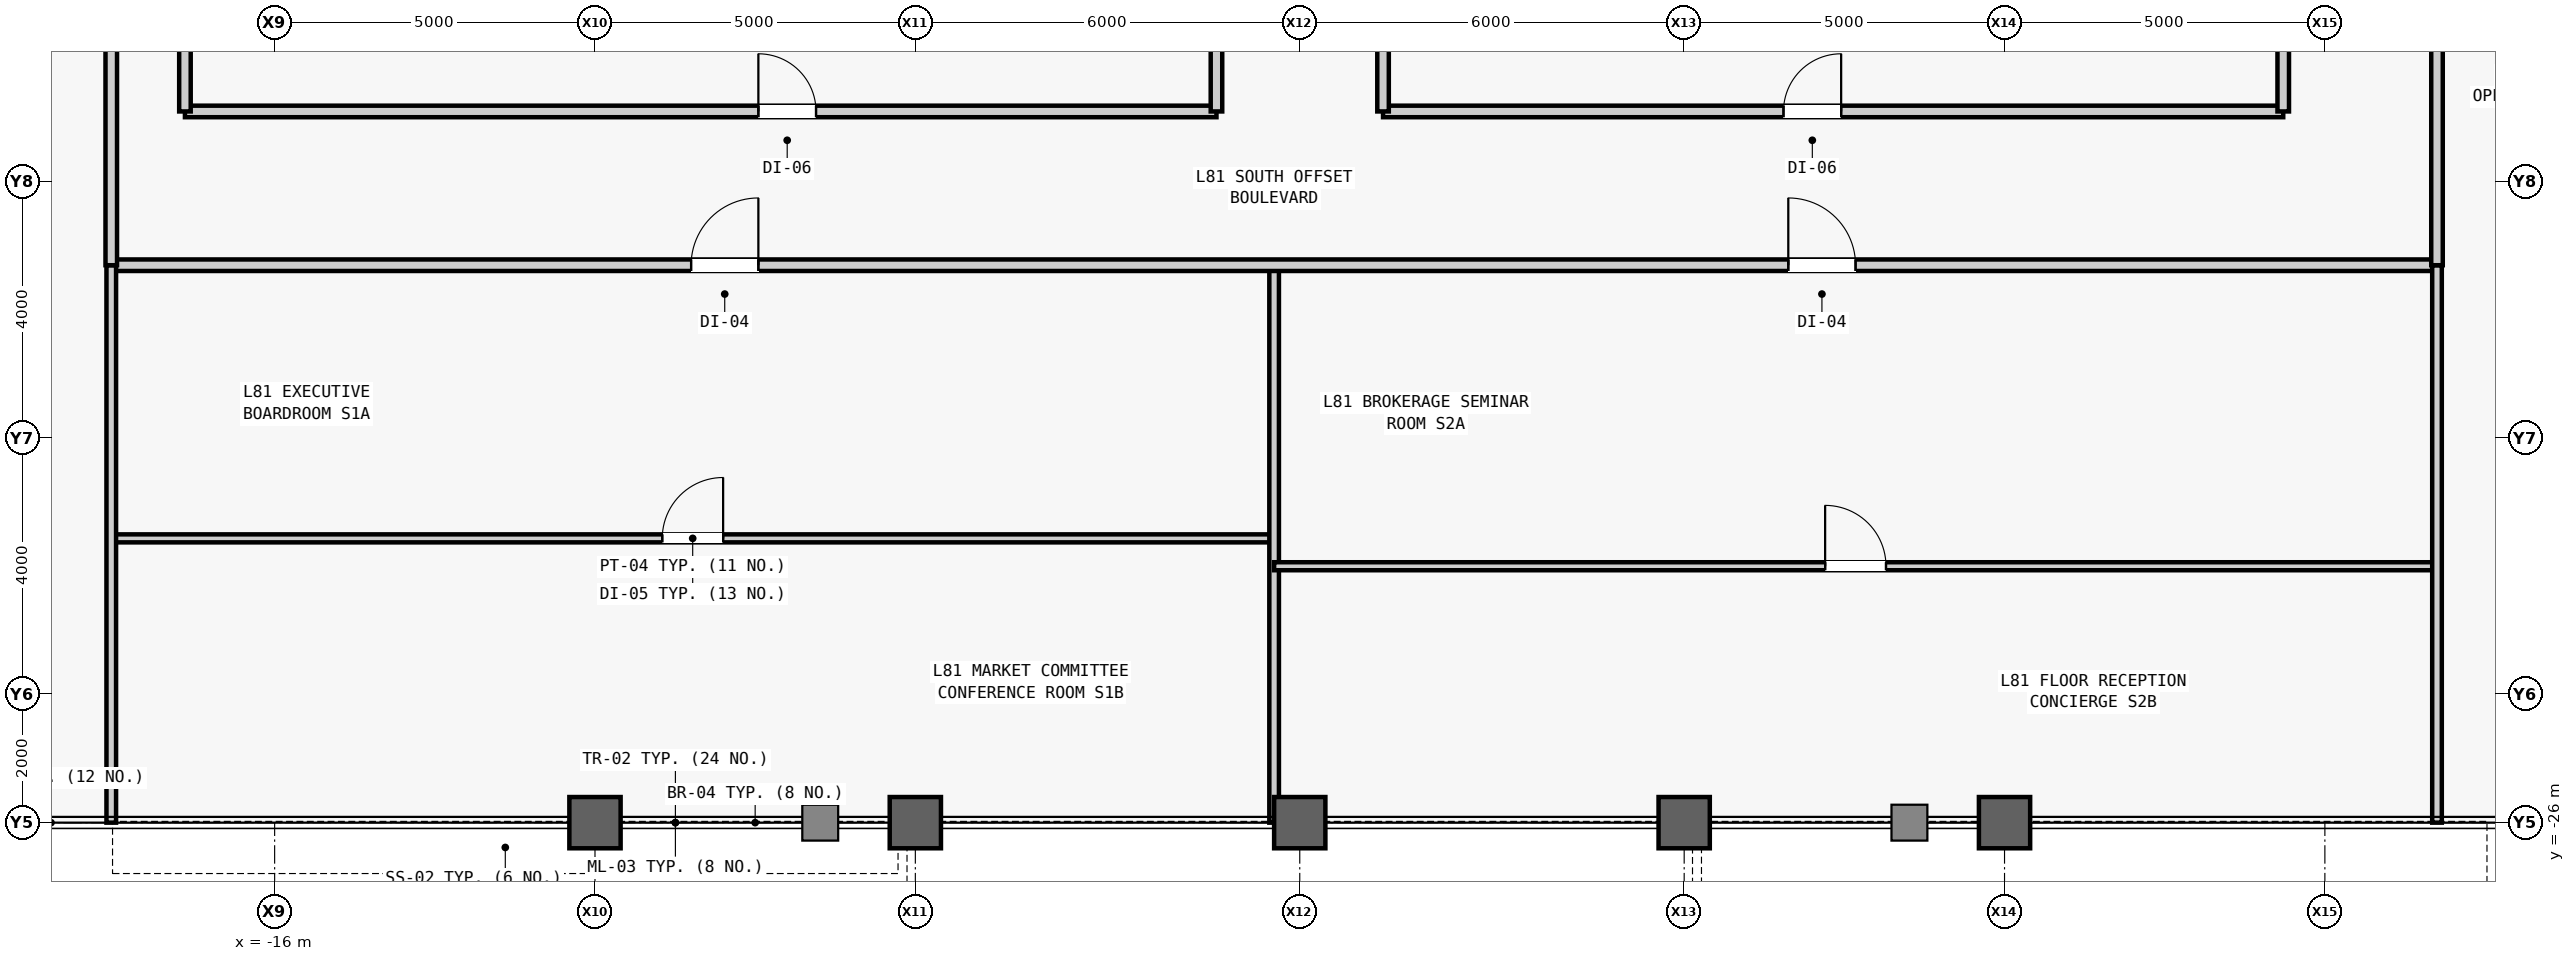
"""IFC4 building model, lengths in metres.
Left out: names, types, materials, properties, quantities, classifications, styles, units other than length and angle.
Written with IfcOpenShell. Run it as: python <this file> out.ifc"""

import sys

from ifc_helpers import new_model, si_unit, direction, frame, frame_2d, origin, origin_2d, place, context, subcontext, project, spatial, rectangle, hollow_rectangle, extrude, source, transform, mapped, element, fill, save


model = new_model("IFC4")
c1 = context("Model", 3, precision=1e-05, world=origin(), true_north=direction((0.0, 1.0)))
c2 = subcontext(c1, "Body", "Model", "MODEL_VIEW")
j1 = project(units=[si_unit("LENGTHUNIT", "METRE"), si_unit("PLANEANGLEUNIT", "RADIAN")], contexts=[c1])
p1 = place(None, origin())
s1 = spatial("IfcSite", under=j1, at=p1, CompositionType="ELEMENT")
p2 = place(p1, origin())
s2 = spatial("IfcBuilding", under=s1, at=p2, CompositionType="ELEMENT")
p3 = place(p2, frame((0.0, 0.0, 342.3)))
s3 = spatial("IfcBuildingStorey", under=s2, at=p3, CompositionType="ELEMENT", Elevation=342.3)
m1 = source(origin(), c2, "Body", "SweptSolid", [
    extrude(hollow_rectangle(XDim=0.8, YDim=0.8, WallThickness=0.045, at=origin_2d()), origin(), (0.0, 0.0, 1.0), 4.0),
])
for number, where, z_axis, x_axis in (
    (1, (-11.0, -26.0, 0.0), (0.0, 0.0, 1.0), (1.0, 0.0, 0.0)),
    (2, (-6.0, -26.0, 0.0), (0.0, 0.0, 1.0), (1.0, 0.0, 0.0)),
    (3, (0.0, -26.0, 0.0), (0.0, 0.0, 1.0), (1.0, 0.0, 0.0)),
    (4, (6.0, -26.0, 0.0), (0.0, 0.0, 1.0), (1.0, 0.0, 0.0)),
    (5, (11.0, -26.0, 0.0), (0.0, 0.0, 1.0), (1.0, 0.0, 0.0)),
):
    element("IfcColumn", number, at=place(p3, frame(where, z_axis=z_axis, x_axis=x_axis)), inside=s3, PredefinedType="COLUMN", context=c2, shape_type="MappedRepresentation", body=[
        mapped(m1, transform((0.0, 0.0, 0.0), scale=1.0)),
    ])
m2 = source(origin(), c2, "Body", "SweptSolid", [
    extrude(rectangle(XDim=16.1, YDim=0.18, at=frame_2d((8.05, 0.0))), origin(), (0.0, 0.0, 1.0), 3.7),
])
p4 = place(p3, frame((-17.4, -14.9, 0.0), z_axis=(0.0, 0.0, 1.0), x_axis=(1.0, 0.0, 0.0)))
e6 = element("IfcWall", 6, at=p4, inside=s3, PredefinedType="PARTITIONING", context=c2, shape_type="MappedRepresentation", body=[
    mapped(m2, transform((0.0, 0.0, 0.0), scale=1.0)),
])
m3 = source(origin(), c2, "Body", "SweptSolid", [
    extrude(rectangle(XDim=0.9, YDim=2.15, at=frame_2d((0.45, 1.075))), frame((0.0, 0.1, 0.0), z_axis=(0.0, -1.0, 0.0), x_axis=(1.0, 0.0, 0.0)), (0.0, 0.0, 1.0), 0.2),
])
p5 = place(p4, frame((8.95, 0.0, 0.0)))
e7 = element("IfcOpeningElement", 7, at=p5, cuts=e6, PredefinedType="OPENING", context=c2, shape_type="MappedRepresentation", body=[
    mapped(m3, transform((0.0, 0.0, 0.0), scale=1.0)),
])
m4 = source(origin(), c2, "Body", "SweptSolid", [
    extrude(rectangle(XDim=5.1, YDim=0.18, at=frame_2d((2.55, 0.0))), origin(), (0.0, 0.0, 1.0), 3.7),
])
p6 = place(p3, frame((-17.4, -14.9, 0.0), z_axis=(0.0, 0.0, 1.0), x_axis=(0.0, 1.0, 0.0)))
e8 = element("IfcWall", 8, at=p6, inside=s3, PredefinedType="PARTITIONING", context=c2, shape_type="MappedRepresentation", body=[
    mapped(m4, transform((0.0, 0.0, 0.0), scale=1.0)),
])
m5 = source(origin(), c2, "Body", "SweptSolid", [
    extrude(rectangle(XDim=3.9, YDim=0.18, at=frame_2d((1.95, 0.0))), origin(), (0.0, 0.0, 1.0), 3.7),
])
p7 = place(p3, frame((-1.3, -14.9, 0.0), z_axis=(0.0, 0.0, 1.0), x_axis=(0.0, 1.0, 0.0)))
e9 = element("IfcWall", 9, at=p7, inside=s3, PredefinedType="PARTITIONING", context=c2, shape_type="MappedRepresentation", body=[
    mapped(m5, transform((0.0, 0.0, 0.0), scale=1.0)),
])
m6 = source(origin(), c2, "Body", "SweptSolid", [
    extrude(rectangle(XDim=14.05, YDim=0.18, at=frame_2d((7.025, 0.0))), origin(), (0.0, 0.0, 1.0), 3.7),
])
p8 = place(p3, frame((1.3, -14.9, 0.0), z_axis=(0.0, 0.0, 1.0), x_axis=(1.0, 0.0, 0.0)))
e10 = element("IfcWall", 10, at=p8, inside=s3, PredefinedType="PARTITIONING", context=c2, shape_type="MappedRepresentation", body=[
    mapped(m6, transform((0.0, 0.0, 0.0), scale=1.0)),
])
p9 = place(p8, frame((6.25, 0.0, 0.0)))
e11 = element("IfcOpeningElement", 11, at=p9, cuts=e10, PredefinedType="OPENING", context=c2, shape_type="MappedRepresentation", body=[
    mapped(m3, transform((0.0, 0.0, 0.0), scale=1.0)),
])
p10 = place(p3, frame((1.3, -14.9, 0.0), z_axis=(0.0, 0.0, 1.0), x_axis=(0.0, 1.0, 0.0)))
e12 = element("IfcWall", 12, at=p10, inside=s3, PredefinedType="PARTITIONING", context=c2, shape_type="MappedRepresentation", body=[
    mapped(m5, transform((0.0, 0.0, 0.0), scale=1.0)),
])
m7 = source(origin(), c2, "Body", "SweptSolid", [
    extrude(rectangle(XDim=4.4, YDim=0.18, at=frame_2d((2.2, 0.0))), origin(), (0.0, 0.0, 1.0), 3.7),
])
p11 = place(p3, frame((15.35, -14.9, 0.0), z_axis=(0.0, 0.0, 1.0), x_axis=(0.0, 1.0, 0.0)))
e13 = element("IfcWall", 13, at=p11, inside=s3, PredefinedType="PARTITIONING", context=c2, shape_type="MappedRepresentation", body=[
    mapped(m7, transform((0.0, 0.0, 0.0), scale=1.0)),
])
m8 = source(origin(), c2, "Body", "SweptSolid", [
    extrude(rectangle(XDim=18.15, YDim=0.125, at=frame_2d((9.075, 0.0))), origin(), (0.0, 0.0, 1.0), 3.7),
])
p12 = place(p3, frame((-18.55, -21.563, 0.0), z_axis=(0.0, 0.0, 1.0), x_axis=(1.0, 0.0, 0.0)))
e14 = element("IfcWall", 14, at=p12, inside=s3, PredefinedType="PARTITIONING", context=c2, shape_type="MappedRepresentation", body=[
    mapped(m8, transform((0.0, 0.0, 0.0), scale=1.0)),
])
m9 = source(origin(), c2, "Body", "SweptSolid", [
    extrude(rectangle(XDim=0.95, YDim=2.15, at=frame_2d((0.475, 1.075))), frame((0.0, 0.073, 0.0), z_axis=(0.0, -1.0, 0.0), x_axis=(1.0, 0.0, 0.0)), (0.0, 0.0, 1.0), 0.145),
])
p13 = place(p12, frame((8.6, 0.0, 0.0)))
e15 = element("IfcOpeningElement", 15, at=p13, cuts=e14, PredefinedType="OPENING", context=c2, shape_type="MappedRepresentation", body=[
    mapped(m9, transform((0.0, 0.0, 0.0), scale=1.0)),
])
m10 = source(origin(), c2, "Body", "SweptSolid", [
    extrude(rectangle(XDim=8.7, YDim=0.15, at=frame_2d((4.35, 0.0))), origin(), (0.0, 0.0, 1.0), 3.7),
])
p14 = place(p3, frame((-0.4, -26.0, 0.0), z_axis=(0.0, 0.0, 1.0), x_axis=(0.0, 1.0, 0.0)))
e16 = element("IfcWall", 16, at=p14, inside=s3, PredefinedType="PARTITIONING", context=c2, shape_type="MappedRepresentation", body=[
    mapped(m10, transform((0.0, 0.0, 0.0), scale=1.0)),
])
m11 = source(origin(), c2, "Body", "SweptSolid", [
    extrude(rectangle(XDim=18.15, YDim=0.125, at=frame_2d((9.075, 0.0))), origin(), (0.0, 0.0, 1.0), 3.7),
])
p15 = place(p3, frame((-0.4, -21.998, 0.0), z_axis=(0.0, 0.0, 1.0), x_axis=(1.0, 0.0, 0.0)))
e17 = element("IfcWall", 17, at=p15, inside=s3, PredefinedType="PARTITIONING", context=c2, shape_type="MappedRepresentation", body=[
    mapped(m11, transform((0.0, 0.0, 0.0), scale=1.0)),
])
p16 = place(p15, frame((8.6, 0.0, 0.0)))
e18 = element("IfcOpeningElement", 18, at=p16, cuts=e17, PredefinedType="OPENING", context=c2, shape_type="MappedRepresentation", body=[
    mapped(m9, transform((0.0, 0.0, 0.0), scale=1.0)),
])
m12 = source(origin(), c2, "Body", "SweptSolid", [
    extrude(rectangle(XDim=36.3, YDim=0.18, at=frame_2d((18.15, 0.0))), origin(), (0.0, 0.0, 1.0), 3.7),
])
p17 = place(p3, frame((-18.55, -17.3, 0.0), z_axis=(0.0, 0.0, 1.0), x_axis=(1.0, 0.0, 0.0)))
e19 = element("IfcWall", 19, at=p17, inside=s3, PredefinedType="PARTITIONING", context=c2, shape_type="MappedRepresentation", body=[
    mapped(m12, transform((0.0, 0.0, 0.0), scale=1.0)),
])
m13 = source(origin(), c2, "Body", "SweptSolid", [
    extrude(rectangle(XDim=1.05, YDim=2.2, at=frame_2d((0.525, 1.1))), frame((0.0, 0.1, 0.0), z_axis=(0.0, -1.0, 0.0), x_axis=(1.0, 0.0, 0.0)), (0.0, 0.0, 1.0), 0.2),
])
p18 = place(p17, frame((9.05, 0.0, 0.0)))
e20 = element("IfcOpeningElement", 20, at=p18, cuts=e19, PredefinedType="OPENING", context=c2, shape_type="MappedRepresentation", body=[
    mapped(m13, transform((0.0, 0.0, 0.0), scale=1.0)),
])
p19 = place(p17, frame((26.175, 0.0, 0.0)))
e21 = element("IfcOpeningElement", 21, at=p19, cuts=e19, PredefinedType="OPENING", context=c2, shape_type="MappedRepresentation", body=[
    mapped(m13, transform((0.0, 0.0, 0.0), scale=1.0)),
])
for number, where, z_axis, x_axis in (
    (22, (-18.55, -26.0, 0.0), (0.0, 0.0, 1.0), (0.0, 1.0, 0.0)),
    (23, (17.75, -26.0, 0.0), (0.0, 0.0, 1.0), (0.0, 1.0, 0.0)),
):
    element("IfcWall", number, at=place(p3, frame(where, z_axis=z_axis, x_axis=x_axis)), inside=s3, PredefinedType="PARTITIONING", context=c2, shape_type="MappedRepresentation", body=[
        mapped(m10, transform((0.0, 0.0, 0.0), scale=1.0)),
    ])
m14 = source(origin(), c2, "Body", "SweptSolid", [
    extrude(rectangle(XDim=37.3, YDim=0.18, at=frame_2d((18.65, 0.0))), origin(), (0.0, 0.0, 1.0), 3.7),
])
p20 = place(p3, frame((-18.55, -17.3, 0.0), z_axis=(0.0, 0.0, 1.0), x_axis=(0.0, 1.0, 0.0)))
e24 = element("IfcWall", 24, at=p20, inside=s3, PredefinedType="PARTITIONING", context=c2, shape_type="MappedRepresentation", body=[
    mapped(m14, transform((0.0, 0.0, 0.0), scale=1.0)),
])
m15 = source(origin(), c2, "Body", "SweptSolid", [
    extrude(rectangle(XDim=0.95, YDim=2.15, at=frame_2d((0.475, 1.075))), frame((0.0, 0.1, 0.0), z_axis=(0.0, -1.0, 0.0), x_axis=(1.0, 0.0, 0.0)), (0.0, 0.0, 1.0), 0.2),
])
p21 = place(p20, frame((6.495, 0.0, 0.0)))
e25 = element("IfcOpeningElement", 25, at=p21, cuts=e24, PredefinedType="OPENING", context=c2, shape_type="MappedRepresentation", body=[
    mapped(m15, transform((0.0, 0.0, 0.0), scale=1.0)),
])
p22 = place(p20, frame((15.65, 0.0, 0.0)))
e26 = element("IfcOpeningElement", 26, at=p22, cuts=e24, PredefinedType="OPENING", context=c2, shape_type="MappedRepresentation", body=[
    mapped(m15, transform((0.0, 0.0, 0.0), scale=1.0)),
])
p23 = place(p20, frame((26.33, 0.0, 0.0)))
e27 = element("IfcOpeningElement", 27, at=p23, cuts=e24, PredefinedType="OPENING", context=c2, shape_type="MappedRepresentation", body=[
    mapped(m15, transform((0.0, 0.0, 0.0), scale=1.0)),
])
p24 = place(p3, frame((17.75, -17.3, 0.0), z_axis=(0.0, 0.0, 1.0), x_axis=(0.0, 1.0, 0.0)))
e28 = element("IfcWall", 28, at=p24, inside=s3, PredefinedType="PARTITIONING", context=c2, shape_type="MappedRepresentation", body=[
    mapped(m14, transform((0.0, 0.0, 0.0), scale=1.0)),
])
p25 = place(p24, frame((5.645, 0.0, 0.0)))
e29 = element("IfcOpeningElement", 29, at=p25, cuts=e28, PredefinedType="OPENING", context=c2, shape_type="MappedRepresentation", body=[
    mapped(m15, transform((0.0, 0.0, 0.0), scale=1.0)),
])
p26 = place(p24, frame((13.04, 0.0, 0.0)))
e30 = element("IfcOpeningElement", 30, at=p26, cuts=e28, PredefinedType="OPENING", context=c2, shape_type="MappedRepresentation", body=[
    mapped(m15, transform((0.0, 0.0, 0.0), scale=1.0)),
])
p27 = place(p24, frame((21.02, 0.0, 0.0)))
e31 = element("IfcOpeningElement", 31, at=p27, cuts=e28, PredefinedType="OPENING", context=c2, shape_type="MappedRepresentation", body=[
    mapped(m15, transform((0.0, 0.0, 0.0), scale=1.0)),
])
p28 = place(p24, frame((27.275, 0.0, 0.0)))
e32 = element("IfcOpeningElement", 32, at=p28, cuts=e28, PredefinedType="OPENING", context=c2, shape_type="MappedRepresentation", body=[
    mapped(m15, transform((0.0, 0.0, 0.0), scale=1.0)),
])
m16 = source(origin(), c2, "Body", "SweptSolid", [
    extrude(rectangle(XDim=0.9, YDim=2.15, at=frame_2d((0.45, 1.075))), frame((0.0, 0.025, 0.0), z_axis=(0.0, -1.0, 0.0), x_axis=(1.0, 0.0, 0.0)), (0.0, 0.0, 1.0), 0.05),
])
p29 = place(p5, origin())
e33 = element("IfcDoor", 33, at=p29, inside=s3, OperationType="SINGLE_SWING_LEFT", PredefinedType="DOOR", context=c2, shape_type="MappedRepresentation", body=[
    mapped(m16, transform((0.0, 0.0, 0.0), scale=1.0)),
])
fill(e7, e33)
p30 = place(p9, origin())
e34 = element("IfcDoor", 34, at=p30, inside=s3, OperationType="SINGLE_SWING_RIGHT", PredefinedType="DOOR", context=c2, shape_type="MappedRepresentation", body=[
    mapped(m16, transform((0.0, 0.0, 0.0), scale=1.0)),
])
fill(e11, e34)
m17 = source(origin(), c2, "Body", "SweptSolid", [
    extrude(rectangle(XDim=0.95, YDim=2.15, at=frame_2d((0.475, 1.075))), frame((0.0, 0.025, 0.0), z_axis=(0.0, -1.0, 0.0), x_axis=(1.0, 0.0, 0.0)), (0.0, 0.0, 1.0), 0.05),
])
p31 = place(p13, origin())
e35 = element("IfcDoor", 35, at=p31, inside=s3, OperationType="SINGLE_SWING_RIGHT", PredefinedType="DOOR", context=c2, shape_type="MappedRepresentation", body=[
    mapped(m17, transform((0.0, 0.0, 0.0), scale=1.0)),
])
fill(e15, e35)
p32 = place(p16, origin())
e36 = element("IfcDoor", 36, at=p32, inside=s3, OperationType="SINGLE_SWING_LEFT", PredefinedType="DOOR", context=c2, shape_type="MappedRepresentation", body=[
    mapped(m17, transform((0.0, 0.0, 0.0), scale=1.0)),
])
fill(e18, e36)
m18 = source(origin(), c2, "Body", "SweptSolid", [
    extrude(rectangle(XDim=1.05, YDim=2.2, at=frame_2d((0.525, 1.1))), frame((0.0, 0.025, 0.0), z_axis=(0.0, -1.0, 0.0), x_axis=(1.0, 0.0, 0.0)), (0.0, 0.0, 1.0), 0.05),
])
p33 = place(p18, origin())
e37 = element("IfcDoor", 37, at=p33, inside=s3, OperationType="SINGLE_SWING_RIGHT", PredefinedType="DOOR", context=c2, shape_type="MappedRepresentation", body=[
    mapped(m18, transform((0.0, 0.0, 0.0), scale=1.0)),
])
fill(e20, e37)
p34 = place(p19, origin())
e38 = element("IfcDoor", 38, at=p34, inside=s3, OperationType="SINGLE_SWING_LEFT", PredefinedType="DOOR", context=c2, shape_type="MappedRepresentation", body=[
    mapped(m18, transform((0.0, 0.0, 0.0), scale=1.0)),
])
fill(e21, e38)
save(model, sys.argv[1])
